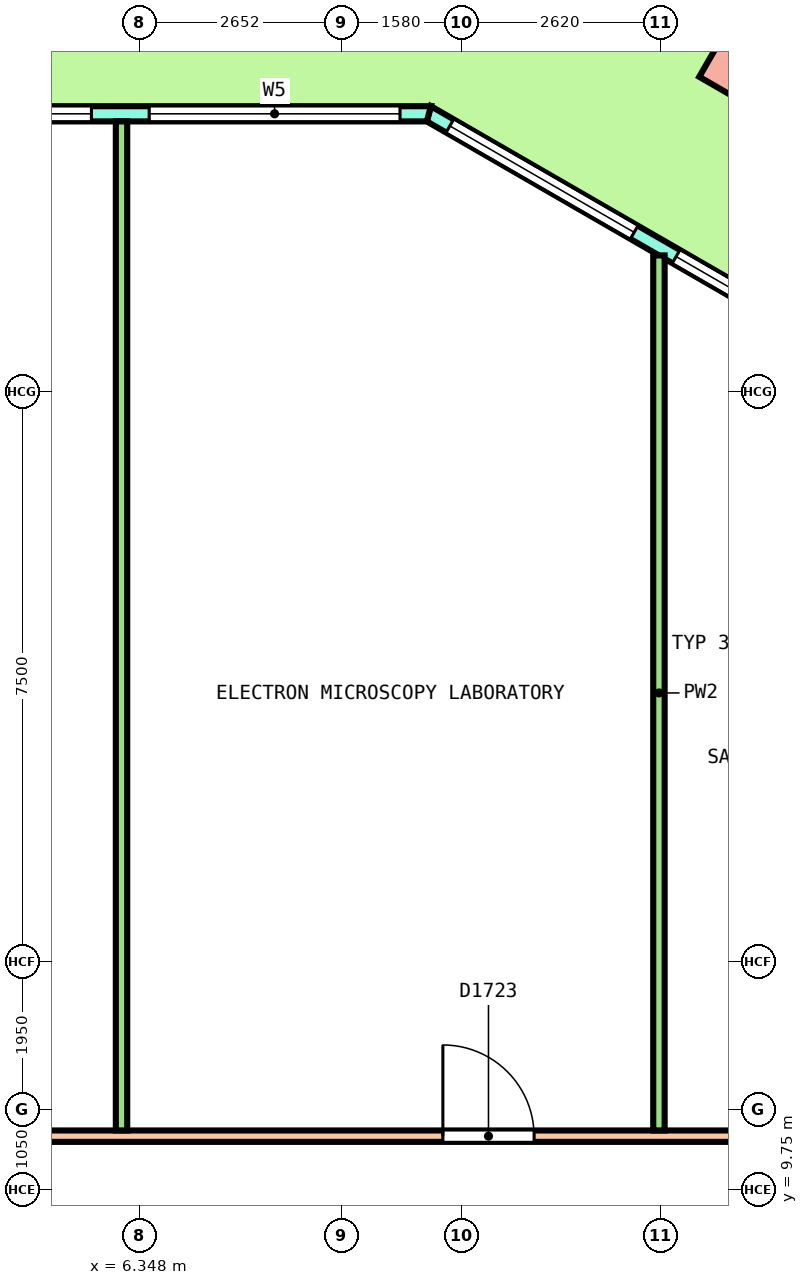
"""IFC4 building model, lengths in metres.
Left out: names, types, materials, properties, quantities, classifications, styles, units other than length and angle.
Written with IfcOpenShell. Run it as: python <this file> out.ifc"""

import sys

from ifc_helpers import new_model, si_unit, direction, frame, frame_2d, origin, origin_2d, place, context, subcontext, project, spatial, polyline, rectangle, outline, extrude, element, fill, save


model = new_model("IFC4")
c1 = context("Model", 3, precision=1e-05, world=origin(), true_north=direction((0.0, 1.0)))
c2 = subcontext(c1, "Body", "Model", "MODEL_VIEW")
j1 = project(units=[si_unit("LENGTHUNIT", "METRE"), si_unit("PLANEANGLEUNIT", "RADIAN")], contexts=[c1])
p1 = place(None, origin())
s1 = spatial("IfcSite", under=j1, at=p1, CompositionType="ELEMENT")
p2 = place(p1, origin())
s2 = spatial("IfcBuilding", under=s1, at=p2, CompositionType="ELEMENT")
p3 = place(p2, frame((0.0, 0.0, 154.0)))
s3 = spatial("IfcBuildingStorey", under=s2, at=p3, CompositionType="ELEMENT", Elevation=154.0)
p4 = place(p3, frame((14.526, 24.606, 0.0), z_axis=(0.036265236264, 0.0, 0.999342199969), x_axis=(-0.865313546461, 0.500246354177, 0.031401456084)))
e1 = element("IfcColumn", 1, at=p4, inside=s3, PredefinedType="COLUMN", context=c2, shape_type="SweptSolid", body=[
    extrude(rectangle(XDim=1.2, YDim=1.2, at=origin_2d()), origin(), (0.0, 0.0, 1.0), 4.053),
])
p5 = place(p3, frame((16.103, 20.463, 0.0), z_axis=(0.0, 0.0, 1.0), x_axis=(-0.866029458321, 0.49999297727, 0.0)))
e2 = element("IfcWall", 2, at=p5, inside=s3, PredefinedType="SOLIDWALL", context=c2, shape_type="SweptSolid", body=[
    extrude(outline(polyline([(-0.027, -0.1), (1.128, -0.1), (2.282, -0.1), (3.437, -0.1), (4.592, -0.1), (5.747, -0.1), (6.901, -0.1), (6.848, 0.1), (5.711, 0.1), (4.574, 0.1), (3.437, 0.1), (2.301, 0.1), (1.164, 0.1), (0.027, 0.1), (-0.027, -0.1)])), origin(), (0.0, 0.0, 1.0), 4.1),
])
p6 = place(p5, frame((0.319, 0.0, 0.1)))
e3 = element("IfcOpeningElement", 3, at=p6, cuts=e2, PredefinedType="OPENING", context=c2, shape_type="SweptSolid", body=[
    extrude(rectangle(XDim=2.8, YDim=2.9, at=frame_2d((1.4, 1.45))), frame((0.0, 0.11, 0.0), z_axis=(0.0, -1.0, 0.0), x_axis=(1.0, 0.0, 0.0)), (0.0, 0.0, 1.0), 0.22),
])
p7 = place(p5, frame((3.756, 0.0, 0.1)))
e4 = element("IfcOpeningElement", 4, at=p7, cuts=e2, PredefinedType="OPENING", context=c2, shape_type="SweptSolid", body=[
    extrude(rectangle(XDim=2.8, YDim=2.9, at=frame_2d((1.4, 1.45))), frame((0.0, 0.11, 0.0), z_axis=(0.0, -1.0, 0.0), x_axis=(1.0, 0.0, 0.0)), (0.0, 0.0, 1.0), 0.22),
])
p8 = place(p3, frame((10.149, 23.9, 0.0), z_axis=(0.0, 0.0, 1.0), x_axis=(-1.0, 0.0, 0.0)))
e5 = element("IfcWall", 5, at=p8, inside=s3, PredefinedType="SOLIDWALL", context=c2, shape_type="SweptSolid", body=[
    extrude(outline(polyline([(-0.027, -0.1), (0.991, -0.1), (2.008, -0.1), (3.026, -0.1), (4.043, -0.1), (5.061, -0.1), (6.079, -0.1), (7.096, -0.1), (8.114, -0.1), (9.131, -0.1), (10.149, -0.1), (11.167, -0.1), (12.184, -0.1), (13.202, -0.1), (14.219, -0.1), (15.237, -0.1), (16.254, -0.1), (17.272, -0.1), (18.29, -0.1), (19.307, -0.1), (20.325, -0.1), (20.271, 0.1), (19.259, 0.1), (18.247, 0.1), (17.234, 0.1), (16.222, 0.1), (15.21, 0.1), (14.198, 0.1), (13.186, 0.1), (12.173, 0.1), (11.161, 0.1), (10.149, 0.1), (9.137, 0.1), (8.125, 0.1), (7.112, 0.1), (6.1, 0.1), (5.088, 0.1), (4.076, 0.1), (3.063, 0.1), (2.051, 0.1), (1.039, 0.1), (0.027, 0.1), (-0.027, -0.1)])), origin(), (0.0, 0.0, 1.0), 4.1),
])
p9 = place(p8, frame((0.38, 0.0, 0.1)))
e6 = element("IfcOpeningElement", 6, at=p9, cuts=e5, PredefinedType="OPENING", context=c2, shape_type="SweptSolid", body=[
    extrude(rectangle(XDim=3.3, YDim=2.9, at=frame_2d((1.65, 1.45))), frame((0.0, 0.11, 0.0), z_axis=(0.0, -1.0, 0.0), x_axis=(1.0, 0.0, 0.0)), (0.0, 0.0, 1.0), 0.22),
])
p10 = place(p8, frame((4.439, 0.0, 0.1)))
e7 = element("IfcOpeningElement", 7, at=p10, cuts=e5, PredefinedType="OPENING", context=c2, shape_type="SweptSolid", body=[
    extrude(rectangle(XDim=3.3, YDim=2.9, at=frame_2d((1.65, 1.45))), frame((0.0, 0.11, 0.0), z_axis=(0.0, -1.0, 0.0), x_axis=(1.0, 0.0, 0.0)), (0.0, 0.0, 1.0), 0.22),
])
p11 = place(p8, frame((9.249, 0.0, 0.0)))
e8 = element("IfcOpeningElement", 8, at=p11, cuts=e5, PredefinedType="OPENING", context=c2, shape_type="SweptSolid", body=[
    extrude(rectangle(XDim=1.8, YDim=2.4, at=frame_2d((0.9, 1.2))), frame((0.0, 0.11, 0.0), z_axis=(0.0, -1.0, 0.0), x_axis=(1.0, 0.0, 0.0)), (0.0, 0.0, 1.0), 0.22),
])
p12 = place(p8, frame((9.249, 0.0, 2.55)))
e9 = element("IfcOpeningElement", 9, at=p12, cuts=e5, PredefinedType="OPENING", context=c2, shape_type="SweptSolid", body=[
    extrude(rectangle(XDim=1.8, YDim=0.45, at=frame_2d((0.9, 0.225))), frame((0.0, 0.11, 0.0), z_axis=(0.0, -1.0, 0.0), x_axis=(1.0, 0.0, 0.0)), (0.0, 0.0, 1.0), 0.22),
])
p13 = place(p8, frame((12.559, 0.0, 0.1)))
e10 = element("IfcOpeningElement", 10, at=p13, cuts=e5, PredefinedType="OPENING", context=c2, shape_type="SweptSolid", body=[
    extrude(rectangle(XDim=3.3, YDim=2.9, at=frame_2d((1.65, 1.45))), frame((0.0, 0.11, 0.0), z_axis=(0.0, -1.0, 0.0), x_axis=(1.0, 0.0, 0.0)), (0.0, 0.0, 1.0), 0.22),
])
p14 = place(p8, frame((16.618, 0.0, 0.1)))
e11 = element("IfcOpeningElement", 11, at=p14, cuts=e5, PredefinedType="OPENING", context=c2, shape_type="SweptSolid", body=[
    extrude(rectangle(XDim=3.3, YDim=2.9, at=frame_2d((1.65, 1.45))), frame((0.0, 0.11, 0.0), z_axis=(0.0, -1.0, 0.0), x_axis=(1.0, 0.0, 0.0)), (0.0, 0.0, 1.0), 0.22),
])
p15 = place(p3, frame((-15.475, 10.45, 0.0), z_axis=(0.0, 0.0, 1.0), x_axis=(1.0, 0.0, 0.0)))
e12 = element("IfcWall", 12, at=p15, inside=s3, PredefinedType="PARTITIONING", context=c2, shape_type="SweptSolid", body=[
    extrude(rectangle(XDim=31.1, YDim=0.15, at=frame_2d((15.55, 0.0))), origin(), (0.0, 0.0, 1.0), 3.05),
])
p16 = place(p15, frame((25.808, 0.0, 0.0)))
e13 = element("IfcOpeningElement", 13, at=p16, cuts=e12, PredefinedType="OPENING", context=c2, shape_type="SweptSolid", body=[
    extrude(rectangle(XDim=1.2, YDim=2.1, at=frame_2d((0.6, 1.05))), frame((0.0, 0.085, 0.0), z_axis=(0.0, -1.0, 0.0), x_axis=(1.0, 0.0, 0.0)), (0.0, 0.0, 1.0), 0.17),
])
p17 = place(p15, frame((14.997, 0.0, 0.0)))
e14 = element("IfcOpeningElement", 14, at=p17, cuts=e12, PredefinedType="OPENING", context=c2, shape_type="SweptSolid", body=[
    extrude(rectangle(XDim=1.2, YDim=2.1, at=frame_2d((0.6, 1.05))), frame((0.0, 0.085, 0.0), z_axis=(0.0, -1.0, 0.0), x_axis=(1.0, 0.0, 0.0)), (0.0, 0.0, 1.0), 0.17),
])
p18 = place(p15, frame((2.533, 0.0, 0.0)))
e15 = element("IfcOpeningElement", 15, at=p18, cuts=e12, PredefinedType="OPENING", context=c2, shape_type="SweptSolid", body=[
    extrude(rectangle(XDim=1.2, YDim=2.1, at=frame_2d((0.6, 1.05))), frame((0.0, 0.085, 0.0), z_axis=(0.0, -1.0, 0.0), x_axis=(1.0, 0.0, 0.0)), (0.0, 0.0, 1.0), 0.17),
])
p19 = place(p3, frame((13.176, 10.525, 0.0), z_axis=(0.0, 0.0, 1.0), x_axis=(0.0, 1.0, 0.0)))
e16 = element("IfcWall", 16, at=p19, inside=s3, PredefinedType="PARTITIONING", context=c2, shape_type="SweptSolid", body=[
    extrude(rectangle(XDim=11.512, YDim=0.15, at=frame_2d((5.756, 0.0))), origin(), (0.0, 0.0, 1.0), 3.05),
])
p20 = place(p3, frame((6.105, 10.525, 0.0), z_axis=(0.0, 0.0, 1.0), x_axis=(0.0, 1.0, 0.0)))
e17 = element("IfcWall", 17, at=p20, inside=s3, PredefinedType="PARTITIONING", context=c2, shape_type="SweptSolid", body=[
    extrude(rectangle(XDim=13.275, YDim=0.15, at=frame_2d((6.638, 0.0))), origin(), (0.0, 0.0, 1.0), 3.05),
])
p21 = place(p6, origin())
e18 = element("IfcWindow", 18, at=p21, inside=s3, PartitioningType="SINGLE_PANEL", PredefinedType="WINDOW", context=c2, shape_type="SweptSolid", body=[
    extrude(rectangle(XDim=2.8, YDim=2.9, at=frame_2d((1.4, 1.45))), frame((0.0, 0.03, 0.0), z_axis=(0.0, -1.0, 0.0), x_axis=(1.0, 0.0, 0.0)), (0.0, 0.0, 1.0), 0.06),
])
fill(e3, e18)
p22 = place(p7, origin())
e19 = element("IfcWindow", 19, at=p22, inside=s3, PartitioningType="SINGLE_PANEL", PredefinedType="WINDOW", context=c2, shape_type="SweptSolid", body=[
    extrude(rectangle(XDim=2.8, YDim=2.9, at=frame_2d((1.4, 1.45))), frame((0.0, 0.03, 0.0), z_axis=(0.0, -1.0, 0.0), x_axis=(1.0, 0.0, 0.0)), (0.0, 0.0, 1.0), 0.06),
])
fill(e4, e19)
p23 = place(p9, origin())
e20 = element("IfcWindow", 20, at=p23, inside=s3, PartitioningType="SINGLE_PANEL", PredefinedType="WINDOW", context=c2, shape_type="SweptSolid", body=[
    extrude(rectangle(XDim=3.3, YDim=2.9, at=frame_2d((1.65, 1.45))), frame((0.0, 0.03, 0.0), z_axis=(0.0, -1.0, 0.0), x_axis=(1.0, 0.0, 0.0)), (0.0, 0.0, 1.0), 0.06),
])
fill(e6, e20)
p24 = place(p10, origin())
e21 = element("IfcWindow", 21, at=p24, inside=s3, PartitioningType="SINGLE_PANEL", PredefinedType="WINDOW", context=c2, shape_type="SweptSolid", body=[
    extrude(rectangle(XDim=3.3, YDim=2.9, at=frame_2d((1.65, 1.45))), frame((0.0, 0.03, 0.0), z_axis=(0.0, -1.0, 0.0), x_axis=(1.0, 0.0, 0.0)), (0.0, 0.0, 1.0), 0.06),
])
fill(e7, e21)
p25 = place(p16, origin())
e22 = element("IfcDoor", 22, at=p25, inside=s3, OperationType="DOUBLE_DOOR_SINGLE_SWING", PredefinedType="DOOR", context=c2, shape_type="SweptSolid", body=[
    extrude(rectangle(XDim=1.2, YDim=2.1, at=frame_2d((0.6, 1.05))), frame((0.0, 0.025, 0.0), z_axis=(0.0, -1.0, 0.0), x_axis=(1.0, 0.0, 0.0)), (0.0, 0.0, 1.0), 0.05),
])
fill(e13, e22)
save(model, sys.argv[1])
